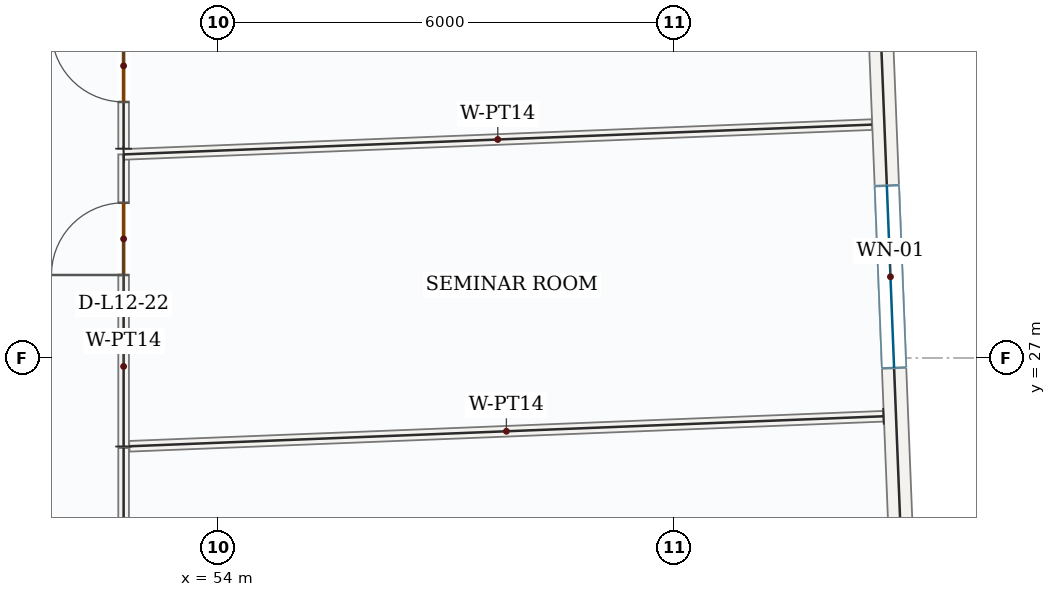
"""IFC4 building model, lengths in metres.
Left out: names, types, materials, properties, quantities, classifications, styles, units other than length and angle.
Written with IfcOpenShell. Run it as: python <this file> out.ifc"""

import sys

from ifc_helpers import new_model, si_unit, direction, frame, frame_2d, origin, place, context, subcontext, project, spatial, rectangle, extrude, source, transform, mapped, element, fill, save


model = new_model("IFC4")
c1 = context("Model", 3, precision=1e-05, world=origin(), true_north=direction((0.0, 1.0)))
c2 = subcontext(c1, "Body", "Model", "MODEL_VIEW")
j1 = project(units=[si_unit("LENGTHUNIT", "METRE"), si_unit("PLANEANGLEUNIT", "RADIAN")], contexts=[c1])
p1 = place(None, origin())
s1 = spatial("IfcSite", under=j1, at=p1, CompositionType="ELEMENT")
p2 = place(p1, origin())
s2 = spatial("IfcBuilding", under=s1, at=p2, CompositionType="ELEMENT")
p3 = place(p2, frame((0.0, 0.0, 58.5)))
s3 = spatial("IfcBuildingStorey", under=s2, at=p3, CompositionType="ELEMENT", Elevation=58.5)
p4 = place(p3, frame((62.641, 33.025, 0.0), z_axis=(0.0, 0.0, 1.0), x_axis=(0.03977146366, -0.999208802342, 0.0)))
e1 = element("IfcWall", 1, at=p4, inside=s3, PredefinedType="SOLIDWALL", context=c2, shape_type="SweptSolid", body=[
    extrude(rectangle(XDim=9.92, YDim=0.32, at=frame_2d((4.96, 0.0))), origin(), (0.0, 0.0, 1.0), 3.95),
])
p5 = place(p4, frame((3.76, 0.0, 0.85)))
e2 = element("IfcOpeningElement", 2, at=p5, cuts=e1, PredefinedType="OPENING", context=c2, shape_type="SweptSolid", body=[
    extrude(rectangle(XDim=2.4, YDim=1.8, at=frame_2d((1.2, 0.9))), frame((0.0, 0.17, 0.0), z_axis=(0.0, -1.0, 0.0), x_axis=(1.0, 0.0, 0.0)), (0.0, 0.0, 1.0), 0.34),
])
p6 = place(p3, frame((52.75, 25.835, 0.0), z_axis=(0.0, 0.0, 1.0), x_axis=(0.0, 1.0, 0.0)))
e3 = element("IfcWall", 3, at=p6, inside=s3, PredefinedType="PARTITIONING", context=c2, shape_type="SweptSolid", body=[
    extrude(rectangle(XDim=3.843, YDim=0.14, at=frame_2d((1.921, 0.0))), origin(), (0.0, 0.0, 1.0), 3.95),
])
p7 = place(p6, frame((2.257, 0.0, 0.0)))
e4 = element("IfcOpeningElement", 4, at=p7, cuts=e3, PredefinedType="OPENING", context=c2, shape_type="SweptSolid", body=[
    extrude(rectangle(XDim=0.95, YDim=2.15, at=frame_2d((0.475, 1.075))), frame((0.0, 0.08, 0.0), z_axis=(0.0, -1.0, 0.0), x_axis=(1.0, 0.0, 0.0)), (0.0, 0.0, 1.0), 0.16),
])
m1 = source(origin(), c2, "Body", "SweptSolid", [
    extrude(rectangle(XDim=9.851, YDim=0.14, at=frame_2d((4.925, 0.0))), origin(), (0.0, 0.0, 1.0), 3.95),
])
p8 = place(p3, frame((52.751, 29.678, 0.0), z_axis=(0.0, 0.0, 1.0), x_axis=(0.999208542072, 0.039778002084, 0.0)))
e5 = element("IfcWall", 5, at=p8, inside=s3, PredefinedType="PARTITIONING", context=c2, shape_type="MappedRepresentation", body=[
    mapped(m1, transform((0.0, 0.0, 0.0), x_axis=(1.0, 0.0, 0.0), y_axis=(0.0, 1.0, 0.0), z_axis=(0.0, 0.0, 1.0), scale=1.0)),
])
m2 = source(origin(), c2, "Body", "SweptSolid", [
    extrude(rectangle(XDim=9.929, YDim=0.14, at=frame_2d((4.965, 0.0))), origin(), (0.0, 0.0, 1.0), 3.95),
])
p9 = place(p3, frame((62.747, 26.233, 0.0), z_axis=(0.0, 0.0, 1.0), x_axis=(-0.999208364847, -0.039782453661, 0.0)))
e6 = element("IfcWall", 6, at=p9, inside=s3, PredefinedType="PARTITIONING", context=c2, shape_type="MappedRepresentation", body=[
    mapped(m2, transform((0.0, 0.0, 0.0), x_axis=(1.0, 0.0, 0.0), y_axis=(0.0, 1.0, 0.0), z_axis=(0.0, 0.0, 1.0), scale=1.0)),
])
p10 = place(p3, frame((52.75, 20.575, 0.0), z_axis=(0.0, 0.0, 1.0), x_axis=(0.0, 1.0, 0.0)))
e7 = element("IfcWall", 7, at=p10, inside=s3, PredefinedType="PARTITIONING", context=c2, shape_type="SweptSolid", body=[
    extrude(rectangle(XDim=5.24, YDim=0.14, at=frame_2d((2.62, 0.0))), origin(), (0.0, 0.0, 1.0), 3.95),
])
p11 = place(p10, frame((2.789, 0.0, 0.0)))
e8 = element("IfcOpeningElement", 8, at=p11, cuts=e7, PredefinedType="OPENING", context=c2, shape_type="SweptSolid", body=[
    extrude(rectangle(XDim=0.95, YDim=2.15, at=frame_2d((0.475, 1.075))), frame((0.0, 0.08, 0.0), z_axis=(0.0, -1.0, 0.0), x_axis=(1.0, 0.0, 0.0)), (0.0, 0.0, 1.0), 0.16),
])
p12 = place(p3, frame((52.75, 29.753, 0.0), z_axis=(0.0, 0.0, 1.0), x_axis=(-0.000326030238, 0.999999946852, 0.0)))
e9 = element("IfcWall", 9, at=p12, inside=s3, PredefinedType="PARTITIONING", context=c2, shape_type="SweptSolid", body=[
    extrude(rectangle(XDim=3.744, YDim=0.14, at=frame_2d((1.872, 0.0))), origin(), (0.0, 0.0, 1.0), 3.95),
])
p13 = place(p12, frame((0.615, 0.0, 0.0)))
e10 = element("IfcOpeningElement", 10, at=p13, cuts=e9, PredefinedType="OPENING", context=c2, shape_type="SweptSolid", body=[
    extrude(rectangle(XDim=0.95, YDim=2.15, at=frame_2d((0.475, 1.075))), frame((0.0, 0.08, 0.0), z_axis=(0.0, -1.0, 0.0), x_axis=(1.0, 0.0, 0.0)), (0.0, 0.0, 1.0), 0.16),
])
m3 = source(origin(), c2, "Body", "SweptSolid", [
    extrude(rectangle(XDim=2.4, YDim=1.8, at=frame_2d((1.2, 0.9))), frame((0.0, 0.03, 0.0), z_axis=(0.0, -1.0, 0.0), x_axis=(1.0, 0.0, 0.0)), (0.0, 0.0, 1.0), 0.06),
])
p14 = place(p5, origin())
e11 = element("IfcWindow", 11, at=p14, inside=s3, PartitioningType="DOUBLE_PANEL_VERTICAL", PredefinedType="WINDOW", context=c2, shape_type="MappedRepresentation", body=[
    mapped(m3, transform((0.0, 0.0, 0.0), x_axis=(1.0, 0.0, 0.0), y_axis=(0.0, 1.0, 0.0), z_axis=(0.0, 0.0, 1.0), scale=1.0)),
])
fill(e2, e11)
m4 = source(origin(), c2, "Body", "SweptSolid", [
    extrude(rectangle(XDim=0.95, YDim=2.15, at=frame_2d((0.475, 1.075))), frame((0.0, 0.025, 0.0), z_axis=(0.0, -1.0, 0.0), x_axis=(1.0, 0.0, 0.0)), (0.0, 0.0, 1.0), 0.05),
])
p15 = place(p7, origin())
e12 = element("IfcDoor", 12, at=p15, inside=s3, OperationType="SINGLE_SWING_LEFT", PredefinedType="DOOR", context=c2, shape_type="MappedRepresentation", body=[
    mapped(m4, transform((0.0, 0.0, 0.0), x_axis=(1.0, 0.0, 0.0), y_axis=(0.0, 1.0, 0.0), z_axis=(0.0, 0.0, 1.0), scale=1.0)),
])
fill(e4, e12)
p16 = place(p13, origin())
e13 = element("IfcDoor", 13, at=p16, inside=s3, OperationType="SINGLE_SWING_RIGHT", PredefinedType="DOOR", context=c2, shape_type="MappedRepresentation", body=[
    mapped(m4, transform((0.0, 0.0, 0.0), x_axis=(1.0, 0.0, 0.0), y_axis=(0.0, 1.0, 0.0), z_axis=(0.0, 0.0, 1.0), scale=1.0)),
])
fill(e10, e13)
save(model, sys.argv[1])
